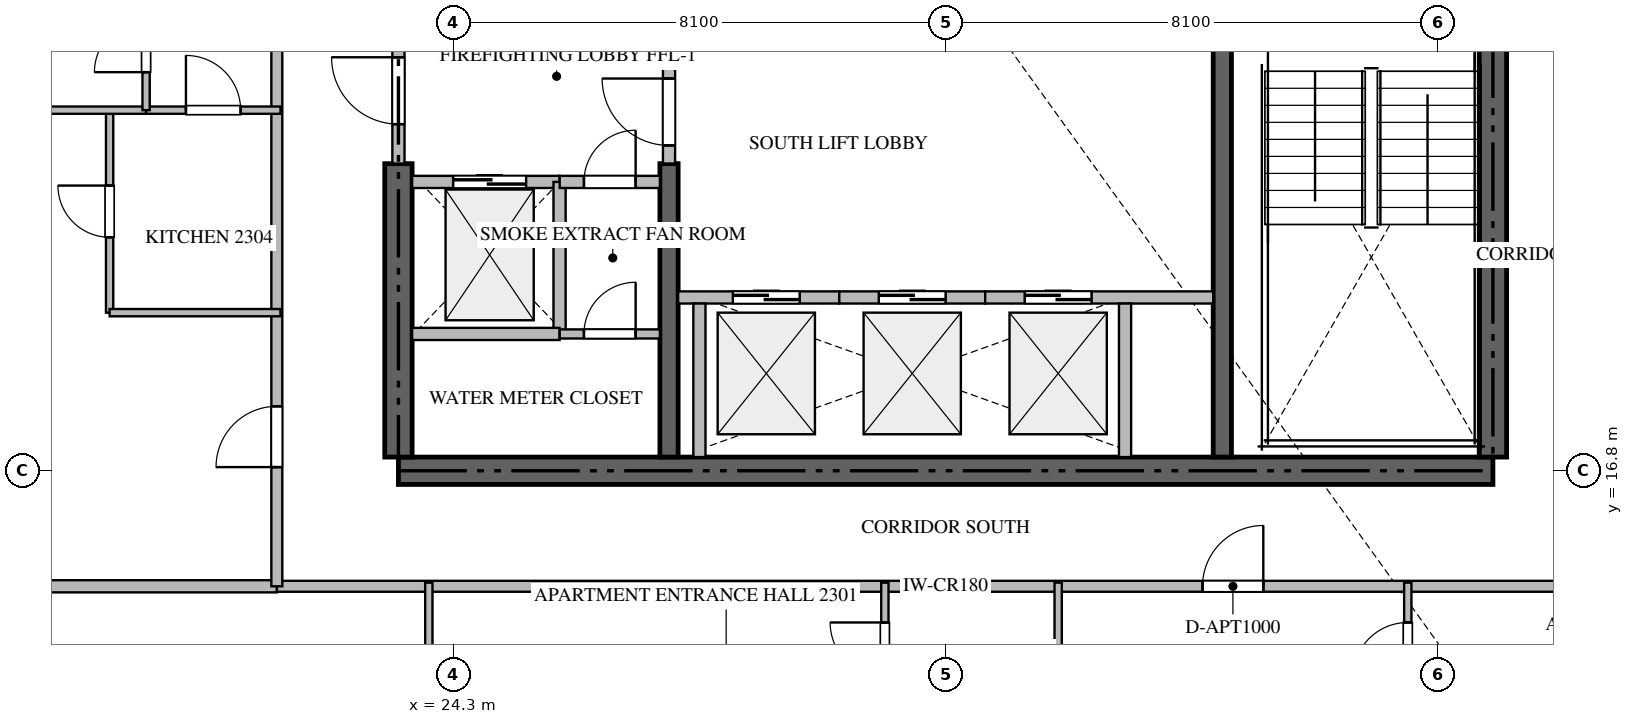
"""IFC4 building model, lengths in metres.
Left out: names, types, materials, properties, quantities, classifications, styles, units other than length and angle.
Written with IfcOpenShell. Run it as: python <this file> out.ifc"""

import sys

from ifc_helpers import new_model, si_unit, direction, frame, frame_2d, origin, place, context, subcontext, project, spatial, rectangle, extrude, source, transform, mapped, element, fill, save


model = new_model("IFC4")
c1 = context("Model", 3, precision=1e-05, world=origin(), true_north=direction((0.0, 1.0)))
c2 = subcontext(c1, "Body", "Model", "MODEL_VIEW")
j1 = project(units=[si_unit("LENGTHUNIT", "METRE"), si_unit("PLANEANGLEUNIT", "RADIAN")], contexts=[c1])
p1 = place(None, origin())
s1 = spatial("IfcSite", under=j1, at=p1, CompositionType="ELEMENT")
p2 = place(p1, origin())
s2 = spatial("IfcBuilding", under=s1, at=p2, CompositionType="ELEMENT")
p3 = place(p2, frame((0.0, 0.0, 94.2)))
s3 = spatial("IfcBuildingStorey", under=s2, at=p3, CompositionType="ELEMENT", Elevation=94.2)
p4 = place(p3, frame((23.4, 16.8, -0.26), z_axis=(0.0, 0.0, 1.0), x_axis=(1.0, 0.0, 0.0)))
e1 = element("IfcWall", 1, at=p4, inside=s3, PredefinedType="SHEAR", context=c2, shape_type="SweptSolid", body=[
    extrude(rectangle(XDim=18.0, YDim=0.45, at=frame_2d((9.0, 0.0))), origin(), (0.0, 0.0, 1.0), 3.748),
])
p5 = place(p3, frame((23.4, 17.025, -0.26), z_axis=(0.0, 0.0, 1.0), x_axis=(0.0, 1.0, 0.0)))
e2 = element("IfcWall", 2, at=p5, inside=s3, PredefinedType="SHEAR", context=c2, shape_type="SweptSolid", body=[
    extrude(rectangle(XDim=4.825, YDim=0.45, at=frame_2d((2.413, 0.0))), origin(), (0.0, 0.0, 1.0), 3.748),
])
p6 = place(p3, frame((41.4, 17.025, -0.26), z_axis=(0.0, 0.0, 1.0), x_axis=(0.0, 1.0, 0.0)))
e3 = element("IfcWall", 3, at=p6, inside=s3, PredefinedType="SHEAR", context=c2, shape_type="SweptSolid", body=[
    extrude(rectangle(XDim=8.325, YDim=0.45, at=frame_2d((4.163, 0.0))), origin(), (0.0, 0.0, 1.0), 3.748),
])
p7 = place(p3, frame((27.85, 17.025, -0.26), z_axis=(0.0, 0.0, 1.0), x_axis=(0.0, 1.0, 0.0)))
e4 = element("IfcWall", 4, at=p7, inside=s3, PredefinedType="SHEAR", context=c2, shape_type="SweptSolid", body=[
    extrude(rectangle(XDim=4.825, YDim=0.3, at=frame_2d((2.413, 0.0))), origin(), (0.0, 0.0, 1.0), 3.748),
])
p8 = place(p3, frame((27.85, 23.55, -0.26), z_axis=(0.0, 0.0, 1.0), x_axis=(0.0, 1.0, 0.0)))
e5 = element("IfcWall", 5, at=p8, inside=s3, PredefinedType="SHEAR", context=c2, shape_type="SweptSolid", body=[
    extrude(rectangle(XDim=9.825, YDim=0.3, at=frame_2d((4.913, 0.0))), origin(), (0.0, 0.0, 1.0), 3.748),
])
p9 = place(p3, frame((36.95, 17.025, -0.26), z_axis=(0.0, 0.0, 1.0), x_axis=(0.0, 1.0, 0.0)))
e6 = element("IfcWall", 6, at=p9, inside=s3, PredefinedType="SHEAR", context=c2, shape_type="SweptSolid", body=[
    extrude(rectangle(XDim=8.325, YDim=0.3, at=frame_2d((4.163, 0.0))), origin(), (0.0, 0.0, 1.0), 3.748),
])
p10 = place(p3, frame((23.625, 21.55, 0.0), z_axis=(0.0, 0.0, 1.0), x_axis=(1.0, 0.0, 0.0)))
e7 = element("IfcWall", 7, at=p10, inside=s3, PredefinedType="STANDARD", context=c2, shape_type="SweptSolid", body=[
    extrude(rectangle(XDim=2.425, YDim=0.2, at=frame_2d((1.212, 0.0))), origin(), (0.0, 0.0, 1.0), 3.49),
])
p11 = place(p10, frame((0.675, 0.0, 0.0)))
e8 = element("IfcOpeningElement", 8, at=p11, cuts=e7, PredefinedType="OPENING", context=c2, shape_type="SweptSolid", body=[
    extrude(rectangle(XDim=1.2, YDim=2.2, at=frame_2d((0.6, 1.1))), frame((0.0, 0.11, 0.0), z_axis=(0.0, -1.0, 0.0), x_axis=(1.0, 0.0, 0.0)), (0.0, 0.0, 1.0), 0.22),
])
p12 = place(p3, frame((28.0, 19.65, 0.0), z_axis=(0.0, 0.0, 1.0), x_axis=(1.0, 0.0, 0.0)))
e9 = element("IfcWall", 9, at=p12, inside=s3, PredefinedType="STANDARD", context=c2, shape_type="SweptSolid", body=[
    extrude(rectangle(XDim=2.65, YDim=0.2, at=frame_2d((1.325, 0.0))), origin(), (0.0, 0.0, 1.0), 3.49),
])
p13 = place(p12, frame((0.9, 0.0, 0.0)))
e10 = element("IfcOpeningElement", 10, at=p13, cuts=e9, PredefinedType="OPENING", context=c2, shape_type="SweptSolid", body=[
    extrude(rectangle(XDim=1.1, YDim=2.2, at=frame_2d((0.55, 1.1))), frame((0.0, 0.11, 0.0), z_axis=(0.0, -1.0, 0.0), x_axis=(1.0, 0.0, 0.0)), (0.0, 0.0, 1.0), 0.22),
])
p14 = place(p3, frame((28.35, 17.025, 0.0), z_axis=(0.0, 0.0, 1.0), x_axis=(0.0, 1.0, 0.0)))
e11 = element("IfcWall", 11, at=p14, inside=s3, PredefinedType="STANDARD", context=c2, shape_type="SweptSolid", body=[
    extrude(rectangle(XDim=2.525, YDim=0.2, at=frame_2d((1.263, 0.0))), origin(), (0.0, 0.0, 1.0), 3.49),
])
p15 = place(p3, frame((30.65, 19.65, 0.0), z_axis=(0.0, 0.0, 1.0), x_axis=(1.0, 0.0, 0.0)))
e12 = element("IfcWall", 12, at=p15, inside=s3, PredefinedType="STANDARD", context=c2, shape_type="SweptSolid", body=[
    extrude(rectangle(XDim=2.4, YDim=0.2, at=frame_2d((1.2, 0.0))), origin(), (0.0, 0.0, 1.0), 3.49),
])
p16 = place(p15, frame((0.65, 0.0, 0.0)))
e13 = element("IfcOpeningElement", 13, at=p16, cuts=e12, PredefinedType="OPENING", context=c2, shape_type="SweptSolid", body=[
    extrude(rectangle(XDim=1.1, YDim=2.2, at=frame_2d((0.55, 1.1))), frame((0.0, 0.11, 0.0), z_axis=(0.0, -1.0, 0.0), x_axis=(1.0, 0.0, 0.0)), (0.0, 0.0, 1.0), 0.22),
])
p17 = place(p3, frame((33.05, 19.65, 0.0), z_axis=(0.0, 0.0, 1.0), x_axis=(1.0, 0.0, 0.0)))
e14 = element("IfcWall", 14, at=p17, inside=s3, PredefinedType="STANDARD", context=c2, shape_type="SweptSolid", body=[
    extrude(rectangle(XDim=3.75, YDim=0.2, at=frame_2d((1.875, 0.0))), origin(), (0.0, 0.0, 1.0), 3.49),
])
p18 = place(p17, frame((0.65, 0.0, 0.0)))
e15 = element("IfcOpeningElement", 15, at=p18, cuts=e14, PredefinedType="OPENING", context=c2, shape_type="SweptSolid", body=[
    extrude(rectangle(XDim=1.1, YDim=2.2, at=frame_2d((0.55, 1.1))), frame((0.0, 0.11, 0.0), z_axis=(0.0, -1.0, 0.0), x_axis=(1.0, 0.0, 0.0)), (0.0, 0.0, 1.0), 0.22),
])
p19 = place(p3, frame((35.35, 17.025, 0.0), z_axis=(0.0, 0.0, 1.0), x_axis=(0.0, 1.0, 0.0)))
e16 = element("IfcWall", 16, at=p19, inside=s3, PredefinedType="STANDARD", context=c2, shape_type="SweptSolid", body=[
    extrude(rectangle(XDim=2.525, YDim=0.2, at=frame_2d((1.263, 0.0))), origin(), (0.0, 0.0, 1.0), 3.49),
])
p20 = place(p3, frame((26.05, 19.05, 0.0), z_axis=(0.0, 0.0, 1.0), x_axis=(0.0, 1.0, 0.0)))
e17 = element("IfcWall", 17, at=p20, inside=s3, PredefinedType="STANDARD", context=c2, shape_type="SweptSolid", body=[
    extrude(rectangle(XDim=2.5, YDim=0.2, at=frame_2d((1.25, 0.0))), origin(), (0.0, 0.0, 1.0), 3.49),
])
p21 = place(p3, frame((23.625, 19.05, 0.0), z_axis=(0.0, 0.0, 1.0), x_axis=(1.0, 0.0, 0.0)))
e18 = element("IfcWall", 18, at=p21, inside=s3, PredefinedType="STANDARD", context=c2, shape_type="SweptSolid", body=[
    extrude(rectangle(XDim=2.425, YDim=0.2, at=frame_2d((1.212, 0.0))), origin(), (0.0, 0.0, 1.0), 3.49),
])
p22 = place(p3, frame((26.052, 21.55, 0.0), z_axis=(0.0, 0.0, 1.0), x_axis=(1.0, 0.0, 0.0)))
e19 = element("IfcWall", 19, at=p22, inside=s3, PredefinedType="STANDARD", context=c2, shape_type="SweptSolid", body=[
    extrude(rectangle(XDim=1.648, YDim=0.2, at=frame_2d((0.824, 0.0))), origin(), (0.0, 0.0, 1.0), 3.49),
])
p23 = place(p22, frame((0.399, 0.0, 0.0)))
e20 = element("IfcOpeningElement", 20, at=p23, cuts=e19, PredefinedType="OPENING", context=c2, shape_type="SweptSolid", body=[
    extrude(rectangle(XDim=0.85, YDim=2.1, at=frame_2d((0.425, 1.05))), frame((0.0, 0.11, 0.0), z_axis=(0.0, -1.0, 0.0), x_axis=(1.0, 0.0, 0.0)), (0.0, 0.0, 1.0), 0.22),
])
p24 = place(p3, frame((23.4, 21.852, 0.0), z_axis=(0.0, 0.0, 1.0), x_axis=(0.0, 1.0, 0.0)))
e21 = element("IfcWall", 21, at=p24, inside=s3, PredefinedType="STANDARD", context=c2, shape_type="SweptSolid", body=[
    extrude(rectangle(XDim=2.396, YDim=0.2, at=frame_2d((1.198, 0.0))), origin(), (0.0, 0.0, 1.0), 3.49),
])
p25 = place(p24, frame((0.648, 0.0, 0.0)))
e22 = element("IfcOpeningElement", 22, at=p25, cuts=e21, PredefinedType="OPENING", context=c2, shape_type="SweptSolid", body=[
    extrude(rectangle(XDim=1.1, YDim=2.15, at=frame_2d((0.55, 1.075))), frame((0.0, 0.11, 0.0), z_axis=(0.0, -1.0, 0.0), x_axis=(1.0, 0.0, 0.0)), (0.0, 0.0, 1.0), 0.22),
])
p26 = place(p3, frame((27.85, 21.852, 0.0), z_axis=(0.0, 0.0, 1.0), x_axis=(0.0, 1.0, 0.0)))
e23 = element("IfcWall", 23, at=p26, inside=s3, PredefinedType="STANDARD", context=c2, shape_type="SweptSolid", body=[
    extrude(rectangle(XDim=1.696, YDim=0.2, at=frame_2d((0.848, 0.0))), origin(), (0.0, 0.0, 1.0), 3.49),
])
p27 = place(p26, frame((0.298, 0.0, 0.0)))
e24 = element("IfcOpeningElement", 24, at=p27, cuts=e23, PredefinedType="OPENING", context=c2, shape_type="SweptSolid", body=[
    extrude(rectangle(XDim=1.1, YDim=2.15, at=frame_2d((0.55, 1.075))), frame((0.0, 0.11, 0.0), z_axis=(0.0, -1.0, 0.0), x_axis=(1.0, 0.0, 0.0)), (0.0, 0.0, 1.0), 0.22),
])
p28 = place(p3, frame((26.052, 19.05, 0.0), z_axis=(0.0, 0.0, 1.0), x_axis=(1.0, 0.0, 0.0)))
e25 = element("IfcWall", 25, at=p28, inside=s3, PredefinedType="PARTITIONING", context=c2, shape_type="SweptSolid", body=[
    extrude(rectangle(XDim=1.648, YDim=0.15, at=frame_2d((0.824, 0.0))), origin(), (0.0, 0.0, 1.0), 3.49),
])
p29 = place(p28, frame((0.399, 0.0, 0.0)))
e26 = element("IfcOpeningElement", 26, at=p29, cuts=e25, PredefinedType="OPENING", context=c2, shape_type="SweptSolid", body=[
    extrude(rectangle(XDim=0.85, YDim=2.1, at=frame_2d((0.425, 1.05))), frame((0.0, 0.085, 0.0), z_axis=(0.0, -1.0, 0.0), x_axis=(1.0, 0.0, 0.0)), (0.0, 0.0, 1.0), 0.17),
])
p30 = place(p3, frame((6.082, 14.9, 0.0), z_axis=(0.0, 0.0, 1.0), x_axis=(1.0, 0.0, 0.0)))
e27 = element("IfcWall", 27, at=p30, inside=s3, PredefinedType="PARTITIONING", context=c2, shape_type="SweptSolid", body=[
    extrude(rectangle(XDim=15.318, YDim=0.2, at=frame_2d((7.659, 0.0))), origin(), (0.0, 0.0, 1.0), 3.49),
])
p31 = place(p3, frame((21.402, 14.9, 0.0), z_axis=(0.0, 0.0, 1.0), x_axis=(1.0, 0.0, 0.0)))
e28 = element("IfcWall", 28, at=p31, inside=s3, PredefinedType="PARTITIONING", context=c2, shape_type="SweptSolid", body=[
    extrude(rectangle(XDim=21.996, YDim=0.18, at=frame_2d((10.998, 0.0))), origin(), (0.0, 0.0, 1.0), 3.49),
])
p32 = place(p31, frame((15.222, 0.0, 0.0)))
e29 = element("IfcOpeningElement", 29, at=p32, cuts=e28, PredefinedType="OPENING", context=c2, shape_type="SweptSolid", body=[
    extrude(rectangle(XDim=1.0, YDim=2.15, at=frame_2d((0.5, 1.075))), frame((0.0, 0.1, 0.0), z_axis=(0.0, -1.0, 0.0), x_axis=(1.0, 0.0, 0.0)), (0.0, 0.0, 1.0), 0.2),
])
p33 = place(p3, frame((21.4, 14.9, 0.0), z_axis=(0.0, 0.0, 1.0), x_axis=(0.0, 1.0, 0.0)))
e30 = element("IfcWall", 30, at=p33, inside=s3, PredefinedType="PARTITIONING", context=c2, shape_type="SweptSolid", body=[
    extrude(rectangle(XDim=20.6, YDim=0.18, at=frame_2d((10.3, 0.0))), origin(), (0.0, 0.0, 1.0), 3.49),
])
p34 = place(p33, frame((1.96, 0.0, 0.0)))
e31 = element("IfcOpeningElement", 31, at=p34, cuts=e30, PredefinedType="OPENING", context=c2, shape_type="SweptSolid", body=[
    extrude(rectangle(XDim=1.0, YDim=2.15, at=frame_2d((0.5, 1.075))), frame((0.0, 0.1, 0.0), z_axis=(0.0, -1.0, 0.0), x_axis=(1.0, 0.0, 0.0)), (0.0, 0.0, 1.0), 0.2),
])
p35 = place(p3, frame((34.25, 12.15, 0.0), z_axis=(0.0, 0.0, 1.0), x_axis=(0.0, 1.0, 0.0)))
e32 = element("IfcWall", 32, at=p35, inside=s3, PredefinedType="PARTITIONING", context=c2, shape_type="SweptSolid", body=[
    extrude(rectangle(XDim=2.81, YDim=0.12, at=frame_2d((1.405, 0.0))), origin(), (0.0, 0.0, 1.0), 3.49),
])
p36 = place(p3, frame((31.4, 12.75, 0.0), z_axis=(0.0, 0.0, 1.0), x_axis=(0.0, 1.0, 0.0)))
e33 = element("IfcWall", 33, at=p36, inside=s3, PredefinedType="PARTITIONING", context=c2, shape_type="SweptSolid", body=[
    extrude(rectangle(XDim=2.21, YDim=0.12, at=frame_2d((1.105, 0.0))), origin(), (0.0, 0.0, 1.0), 3.49),
])
p37 = place(p36, frame((0.655, 0.0, 0.0)))
e34 = element("IfcOpeningElement", 34, at=p37, cuts=e33, PredefinedType="OPENING", context=c2, shape_type="SweptSolid", body=[
    extrude(rectangle(XDim=0.9, YDim=2.1, at=frame_2d((0.45, 1.05))), frame((0.0, 0.07, 0.0), z_axis=(0.0, -1.0, 0.0), x_axis=(1.0, 0.0, 0.0)), (0.0, 0.0, 1.0), 0.14),
])
p38 = place(p3, frame((23.9, 12.752, 0.0), z_axis=(0.0, 0.0, 1.0), x_axis=(0.0, 1.0, 0.0)))
e35 = element("IfcWall", 35, at=p38, inside=s3, PredefinedType="PARTITIONING", context=c2, shape_type="SweptSolid", body=[
    extrude(rectangle(XDim=2.208, YDim=0.12, at=frame_2d((1.104, 0.0))), origin(), (0.0, 0.0, 1.0), 3.49),
])
p39 = place(p3, frame((40.0, 12.75, 0.0), z_axis=(0.0, 0.0, 1.0), x_axis=(0.0, 1.0, 0.0)))
e36 = element("IfcWall", 36, at=p39, inside=s3, PredefinedType="PARTITIONING", context=c2, shape_type="SweptSolid", body=[
    extrude(rectangle(XDim=2.21, YDim=0.12, at=frame_2d((1.105, 0.0))), origin(), (0.0, 0.0, 1.0), 3.49),
])
p40 = place(p39, frame((0.655, 0.0, 0.0)))
e37 = element("IfcOpeningElement", 37, at=p40, cuts=e36, PredefinedType="OPENING", context=c2, shape_type="SweptSolid", body=[
    extrude(rectangle(XDim=0.9, YDim=2.1, at=frame_2d((0.45, 1.05))), frame((0.0, 0.07, 0.0), z_axis=(0.0, -1.0, 0.0), x_axis=(1.0, 0.0, 0.0)), (0.0, 0.0, 1.0), 0.14),
])
p41 = place(p3, frame((18.65, 19.4, 0.0), z_axis=(0.0, 0.0, 1.0), x_axis=(0.0, 1.0, 0.0)))
e38 = element("IfcWall", 38, at=p41, inside=s3, PredefinedType="PARTITIONING", context=c2, shape_type="SweptSolid", body=[
    extrude(rectangle(XDim=3.33, YDim=0.12, at=frame_2d((1.665, 0.0))), origin(), (0.0, 0.0, 1.0), 3.49),
])
p42 = place(p41, frame((1.24, 0.0, 0.0)))
e39 = element("IfcOpeningElement", 39, at=p42, cuts=e38, PredefinedType="OPENING", context=c2, shape_type="SweptSolid", body=[
    extrude(rectangle(XDim=0.85, YDim=2.1, at=frame_2d((0.425, 1.05))), frame((0.0, 0.07, 0.0), z_axis=(0.0, -1.0, 0.0), x_axis=(1.0, 0.0, 0.0)), (0.0, 0.0, 1.0), 0.14),
])
p43 = place(p3, frame((18.65, 19.4, 0.0), z_axis=(0.0, 0.0, 1.0), x_axis=(1.0, 0.0, 0.0)))
e40 = element("IfcWall", 40, at=p43, inside=s3, PredefinedType="PARTITIONING", context=c2, shape_type="SweptSolid", body=[
    extrude(rectangle(XDim=2.81, YDim=0.12, at=frame_2d((1.405, 0.0))), origin(), (0.0, 0.0, 1.0), 3.49),
])
p44 = place(p3, frame((19.25, 22.73, 0.0), z_axis=(0.0, 0.0, 1.0), x_axis=(1.0, 0.0, 0.0)))
e41 = element("IfcWall", 41, at=p44, inside=s3, PredefinedType="PARTITIONING", context=c2, shape_type="SweptSolid", body=[
    extrude(rectangle(XDim=2.21, YDim=0.12, at=frame_2d((1.105, 0.0))), origin(), (0.0, 0.0, 1.0), 3.49),
])
p45 = place(p44, frame((0.655, 0.0, 0.0)))
e42 = element("IfcOpeningElement", 42, at=p45, cuts=e41, PredefinedType="OPENING", context=c2, shape_type="SweptSolid", body=[
    extrude(rectangle(XDim=0.9, YDim=2.1, at=frame_2d((0.45, 1.05))), frame((0.0, 0.07, 0.0), z_axis=(0.0, -1.0, 0.0), x_axis=(1.0, 0.0, 0.0)), (0.0, 0.0, 1.0), 0.14),
])
p46 = place(p3, frame((10.121, 22.73, 0.0), z_axis=(0.0, 0.0, 1.0), x_axis=(1.0, 0.0, 0.0)))
e43 = element("IfcWall", 43, at=p46, inside=s3, PredefinedType="PARTITIONING", context=c2, shape_type="SweptSolid", body=[
    extrude(rectangle(XDim=9.127, YDim=0.12, at=frame_2d((4.563, 0.0))), origin(), (0.0, 0.0, 1.0), 3.49),
])
p47 = place(p3, frame((19.25, 22.73, 0.0), z_axis=(0.0, 0.0, 1.0), x_axis=(0.0, 1.0, 0.0)))
e44 = element("IfcWall", 44, at=p47, inside=s3, PredefinedType="PARTITIONING", context=c2, shape_type="SweptSolid", body=[
    extrude(rectangle(XDim=2.1, YDim=0.12, at=frame_2d((1.05, 0.0))), origin(), (0.0, 0.0, 1.0), 3.49),
])
p48 = place(p47, frame((0.625, 0.0, 0.0)))
e45 = element("IfcOpeningElement", 45, at=p48, cuts=e44, PredefinedType="OPENING", context=c2, shape_type="SweptSolid", body=[
    extrude(rectangle(XDim=0.85, YDim=2.1, at=frame_2d((0.425, 1.05))), frame((0.0, 0.07, 0.0), z_axis=(0.0, -1.0, 0.0), x_axis=(1.0, 0.0, 0.0)), (0.0, 0.0, 1.0), 0.14),
])
m1 = source(origin(), c2, "Body", "SweptSolid", [
    extrude(rectangle(XDim=1.2, YDim=2.2, at=frame_2d((0.6, 1.1))), frame((0.0, 0.025, 0.0), z_axis=(0.0, -1.0, 0.0), x_axis=(1.0, 0.0, 0.0)), (0.0, 0.0, 1.0), 0.05),
])
p49 = place(p11, origin())
e46 = element("IfcDoor", 46, at=p49, inside=s3, OperationType="DOUBLE_DOOR_SLIDING", PredefinedType="DOOR", context=c2, shape_type="MappedRepresentation", body=[
    mapped(m1, transform((0.0, 0.0, 0.0), scale=1.0)),
])
fill(e8, e46)
m2 = source(origin(), c2, "Body", "SweptSolid", [
    extrude(rectangle(XDim=1.1, YDim=2.2, at=frame_2d((0.55, 1.1))), frame((0.0, 0.025, 0.0), z_axis=(0.0, -1.0, 0.0), x_axis=(1.0, 0.0, 0.0)), (0.0, 0.0, 1.0), 0.05),
])
p50 = place(p13, origin())
e47 = element("IfcDoor", 47, at=p50, inside=s3, OperationType="DOUBLE_DOOR_SLIDING", PredefinedType="DOOR", context=c2, shape_type="MappedRepresentation", body=[
    mapped(m2, transform((0.0, 0.0, 0.0), scale=1.0)),
])
fill(e10, e47)
p51 = place(p16, origin())
e48 = element("IfcDoor", 48, at=p51, inside=s3, OperationType="DOUBLE_DOOR_SLIDING", PredefinedType="DOOR", context=c2, shape_type="MappedRepresentation", body=[
    mapped(m2, transform((0.0, 0.0, 0.0), scale=1.0)),
])
fill(e13, e48)
p52 = place(p18, origin())
e49 = element("IfcDoor", 49, at=p52, inside=s3, OperationType="DOUBLE_DOOR_SLIDING", PredefinedType="DOOR", context=c2, shape_type="MappedRepresentation", body=[
    mapped(m2, transform((0.0, 0.0, 0.0), scale=1.0)),
])
fill(e15, e49)
m3 = source(origin(), c2, "Body", "SweptSolid", [
    extrude(rectangle(XDim=0.85, YDim=2.1, at=frame_2d((0.425, 1.05))), frame((0.0, 0.025, 0.0), z_axis=(0.0, -1.0, 0.0), x_axis=(1.0, 0.0, 0.0)), (0.0, 0.0, 1.0), 0.05),
])
p53 = place(p23, origin())
e50 = element("IfcDoor", 50, at=p53, inside=s3, OperationType="SINGLE_SWING_RIGHT", PredefinedType="DOOR", context=c2, shape_type="MappedRepresentation", body=[
    mapped(m3, transform((0.0, 0.0, 0.0), scale=1.0)),
])
fill(e20, e50)
m4 = source(origin(), c2, "Body", "SweptSolid", [
    extrude(rectangle(XDim=1.1, YDim=2.15, at=frame_2d((0.55, 1.075))), frame((0.0, 0.025, 0.0), z_axis=(0.0, -1.0, 0.0), x_axis=(1.0, 0.0, 0.0)), (0.0, 0.0, 1.0), 0.05),
])
p54 = place(p25, origin())
e51 = element("IfcDoor", 51, at=p54, inside=s3, OperationType="SINGLE_SWING_RIGHT", PredefinedType="DOOR", context=c2, shape_type="MappedRepresentation", body=[
    mapped(m4, transform((0.0, 0.0, 0.0), scale=1.0)),
])
fill(e22, e51)
p55 = place(p27, origin())
e52 = element("IfcDoor", 52, at=p55, inside=s3, OperationType="SINGLE_SWING_RIGHT", PredefinedType="DOOR", context=c2, shape_type="MappedRepresentation", body=[
    mapped(m4, transform((0.0, 0.0, 0.0), scale=1.0)),
])
fill(e24, e52)
p56 = place(p29, origin())
e53 = element("IfcDoor", 53, at=p56, inside=s3, OperationType="SINGLE_SWING_RIGHT", PredefinedType="DOOR", context=c2, shape_type="MappedRepresentation", body=[
    mapped(m3, transform((0.0, 0.0, 0.0), scale=1.0)),
])
fill(e26, e53)
m5 = source(origin(), c2, "Body", "SweptSolid", [
    extrude(rectangle(XDim=1.0, YDim=2.15, at=frame_2d((0.5, 1.075))), frame((0.0, 0.025, 0.0), z_axis=(0.0, -1.0, 0.0), x_axis=(1.0, 0.0, 0.0)), (0.0, 0.0, 1.0), 0.05),
])
p57 = place(p32, origin())
e54 = element("IfcDoor", 54, at=p57, inside=s3, OperationType="SINGLE_SWING_RIGHT", PredefinedType="DOOR", context=c2, shape_type="MappedRepresentation", body=[
    mapped(m5, transform((0.0, 0.0, 0.0), scale=1.0)),
])
fill(e29, e54)
p58 = place(p34, origin())
e55 = element("IfcDoor", 55, at=p58, inside=s3, OperationType="SINGLE_SWING_LEFT", PredefinedType="DOOR", context=c2, shape_type="MappedRepresentation", body=[
    mapped(m5, transform((0.0, 0.0, 0.0), scale=1.0)),
])
fill(e31, e55)
m6 = source(origin(), c2, "Body", "SweptSolid", [
    extrude(rectangle(XDim=0.9, YDim=2.1, at=frame_2d((0.45, 1.05))), frame((0.0, 0.025, 0.0), z_axis=(0.0, -1.0, 0.0), x_axis=(1.0, 0.0, 0.0)), (0.0, 0.0, 1.0), 0.05),
])
p59 = place(p37, origin())
e56 = element("IfcDoor", 56, at=p59, inside=s3, OperationType="SINGLE_SWING_RIGHT", PredefinedType="DOOR", context=c2, shape_type="MappedRepresentation", body=[
    mapped(m6, transform((0.0, 0.0, 0.0), scale=1.0)),
])
fill(e34, e56)
p60 = place(p40, origin())
e57 = element("IfcDoor", 57, at=p60, inside=s3, OperationType="SINGLE_SWING_LEFT", PredefinedType="DOOR", context=c2, shape_type="MappedRepresentation", body=[
    mapped(m6, transform((0.0, 0.0, 0.0), scale=1.0)),
])
fill(e37, e57)
p61 = place(p42, origin())
e58 = element("IfcDoor", 58, at=p61, inside=s3, OperationType="SINGLE_SWING_RIGHT", PredefinedType="DOOR", context=c2, shape_type="MappedRepresentation", body=[
    mapped(m3, transform((0.0, 0.0, 0.0), scale=1.0)),
])
fill(e39, e58)
p62 = place(p45, origin())
e59 = element("IfcDoor", 59, at=p62, inside=s3, OperationType="SINGLE_SWING_LEFT", PredefinedType="DOOR", context=c2, shape_type="MappedRepresentation", body=[
    mapped(m6, transform((0.0, 0.0, 0.0), scale=1.0)),
])
fill(e42, e59)
p63 = place(p48, origin())
e60 = element("IfcDoor", 60, at=p63, inside=s3, OperationType="SINGLE_SWING_LEFT", PredefinedType="DOOR", context=c2, shape_type="MappedRepresentation", body=[
    mapped(m3, transform((0.0, 0.0, 0.0), scale=1.0)),
])
fill(e45, e60)
save(model, sys.argv[1])
